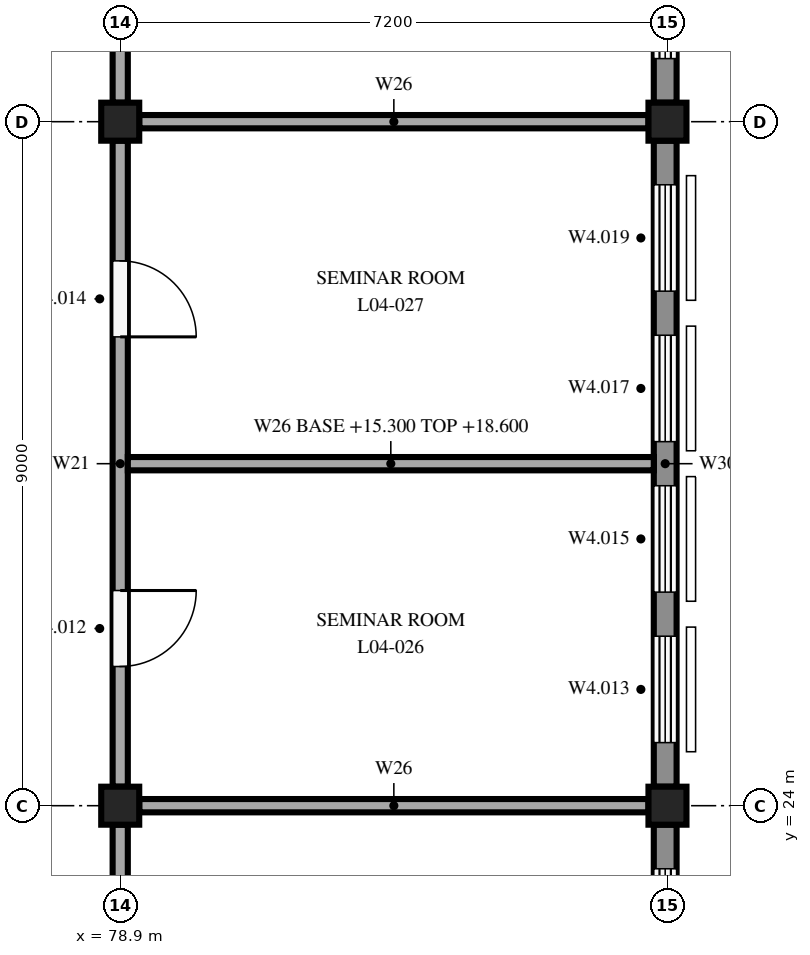
"""IFC4 building model, lengths in metres.
Left out: names, types, materials, properties, quantities, classifications, styles, units other than length and angle.
Written with IfcOpenShell. Run it as: python <this file> out.ifc"""

import sys

from ifc_helpers import new_model, si_unit, direction, frame, frame_2d, origin, origin_2d, place, context, subcontext, project, spatial, rectangle, extrude, element, fill, save


model = new_model("IFC4")
c1 = context("Model", 3, precision=1e-05, world=origin(), true_north=direction((0.0, 1.0)))
c2 = subcontext(c1, "Body", "Model", "MODEL_VIEW")
j1 = project(units=[si_unit("LENGTHUNIT", "METRE"), si_unit("PLANEANGLEUNIT", "RADIAN")], contexts=[c1])
p1 = place(None, origin())
s1 = spatial("IfcSite", under=j1, at=p1, CompositionType="ELEMENT")
p2 = place(p1, origin())
s2 = spatial("IfcBuilding", under=s1, at=p2, CompositionType="ELEMENT")
p3 = place(p2, frame((0.0, 0.0, 15.3)))
s3 = spatial("IfcBuildingStorey", under=s2, at=p3, CompositionType="ELEMENT", Elevation=15.3)
for number, where, z_axis, x_axis in (
    (1, (78.9, 24.0, 0.0), (0.0, 0.0, 1.0), (1.0, 0.0, 0.0)),
    (2, (78.9, 33.0, 0.0), (0.0, 0.0, 1.0), (1.0, 0.0, 0.0)),
    (3, (86.1, 24.0, 0.0), (0.0, 0.0, 1.0), (1.0, 0.0, 0.0)),
    (4, (86.1, 33.0, 0.0), (0.0, 0.0, 1.0), (1.0, 0.0, 0.0)),
):
    element("IfcColumn", number, at=place(p3, frame(where, z_axis=z_axis, x_axis=x_axis)), inside=s3, PredefinedType="COLUMN", context=c2, shape_type="SweptSolid", body=[
        extrude(rectangle(XDim=0.5, YDim=0.5, at=origin_2d()), origin(), (0.0, 0.0, 1.0), 3.3),
    ])
p4 = place(p3, frame((86.07, 23.75, 0.0), z_axis=(0.0, 0.0, 1.0), x_axis=(0.0, -1.0, 0.0)))
e5 = element("IfcWall", 5, at=p4, inside=s3, PredefinedType="STANDARD", context=c2, shape_type="SweptSolid", body=[
    extrude(rectangle(XDim=8.5, YDim=0.3, at=frame_2d((4.25, 0.0))), origin(), (0.0, 0.0, 1.0), 2.75),
])
p5 = place(p4, frame((6.52, 0.0, 0.6)))
e6 = element("IfcOpeningElement", 6, at=p5, cuts=e5, PredefinedType="OPENING", context=c2, shape_type="SweptSolid", body=[
    extrude(rectangle(XDim=1.4, YDim=2.1, at=frame_2d((0.7, 1.05))), frame((0.0, 0.16, 0.0), z_axis=(0.0, -1.0, 0.0), x_axis=(1.0, 0.0, 0.0)), (0.0, 0.0, 1.0), 0.32),
])
p6 = place(p4, frame((4.54, 0.0, 0.6)))
e7 = element("IfcOpeningElement", 7, at=p6, cuts=e5, PredefinedType="OPENING", context=c2, shape_type="SweptSolid", body=[
    extrude(rectangle(XDim=1.4, YDim=2.1, at=frame_2d((0.7, 1.05))), frame((0.0, 0.16, 0.0), z_axis=(0.0, -1.0, 0.0), x_axis=(1.0, 0.0, 0.0)), (0.0, 0.0, 1.0), 0.32),
])
p7 = place(p4, frame((2.56, 0.0, 0.6)))
e8 = element("IfcOpeningElement", 8, at=p7, cuts=e5, PredefinedType="OPENING", context=c2, shape_type="SweptSolid", body=[
    extrude(rectangle(XDim=1.4, YDim=2.1, at=frame_2d((0.7, 1.05))), frame((0.0, 0.16, 0.0), z_axis=(0.0, -1.0, 0.0), x_axis=(1.0, 0.0, 0.0)), (0.0, 0.0, 1.0), 0.32),
])
p8 = place(p4, frame((0.58, 0.0, 0.6)))
e9 = element("IfcOpeningElement", 9, at=p8, cuts=e5, PredefinedType="OPENING", context=c2, shape_type="SweptSolid", body=[
    extrude(rectangle(XDim=1.4, YDim=2.1, at=frame_2d((0.7, 1.05))), frame((0.0, 0.16, 0.0), z_axis=(0.0, -1.0, 0.0), x_axis=(1.0, 0.0, 0.0)), (0.0, 0.0, 1.0), 0.32),
])
p9 = place(p3, frame((86.07, 32.75, 0.0), z_axis=(0.0, 0.0, 1.0), x_axis=(0.0, -1.0, 0.0)))
e10 = element("IfcWall", 10, at=p9, inside=s3, PredefinedType="STANDARD", context=c2, shape_type="SweptSolid", body=[
    extrude(rectangle(XDim=8.5, YDim=0.3, at=frame_2d((4.25, 0.0))), origin(), (0.0, 0.0, 1.0), 2.75),
])
p10 = place(p9, frame((6.52, 0.0, 0.6)))
e11 = element("IfcOpeningElement", 11, at=p10, cuts=e10, PredefinedType="OPENING", context=c2, shape_type="SweptSolid", body=[
    extrude(rectangle(XDim=1.4, YDim=2.1, at=frame_2d((0.7, 1.05))), frame((0.0, 0.16, 0.0), z_axis=(0.0, -1.0, 0.0), x_axis=(1.0, 0.0, 0.0)), (0.0, 0.0, 1.0), 0.32),
])
p11 = place(p9, frame((4.54, 0.0, 0.6)))
e12 = element("IfcOpeningElement", 12, at=p11, cuts=e10, PredefinedType="OPENING", context=c2, shape_type="SweptSolid", body=[
    extrude(rectangle(XDim=1.4, YDim=2.1, at=frame_2d((0.7, 1.05))), frame((0.0, 0.16, 0.0), z_axis=(0.0, -1.0, 0.0), x_axis=(1.0, 0.0, 0.0)), (0.0, 0.0, 1.0), 0.32),
])
p12 = place(p9, frame((2.56, 0.0, 0.6)))
e13 = element("IfcOpeningElement", 13, at=p12, cuts=e10, PredefinedType="OPENING", context=c2, shape_type="SweptSolid", body=[
    extrude(rectangle(XDim=1.4, YDim=2.1, at=frame_2d((0.7, 1.05))), frame((0.0, 0.16, 0.0), z_axis=(0.0, -1.0, 0.0), x_axis=(1.0, 0.0, 0.0)), (0.0, 0.0, 1.0), 0.32),
])
p13 = place(p9, frame((0.58, 0.0, 0.6)))
e14 = element("IfcOpeningElement", 14, at=p13, cuts=e10, PredefinedType="OPENING", context=c2, shape_type="SweptSolid", body=[
    extrude(rectangle(XDim=1.4, YDim=2.1, at=frame_2d((0.7, 1.05))), frame((0.0, 0.16, 0.0), z_axis=(0.0, -1.0, 0.0), x_axis=(1.0, 0.0, 0.0)), (0.0, 0.0, 1.0), 0.32),
])
p14 = place(p3, frame((86.07, 41.75, 0.0), z_axis=(0.0, 0.0, 1.0), x_axis=(0.0, -1.0, 0.0)))
e15 = element("IfcWall", 15, at=p14, inside=s3, PredefinedType="STANDARD", context=c2, shape_type="SweptSolid", body=[
    extrude(rectangle(XDim=8.5, YDim=0.3, at=frame_2d((4.25, 0.0))), origin(), (0.0, 0.0, 1.0), 2.75),
])
p15 = place(p14, frame((6.52, 0.0, 0.6)))
e16 = element("IfcOpeningElement", 16, at=p15, cuts=e15, PredefinedType="OPENING", context=c2, shape_type="SweptSolid", body=[
    extrude(rectangle(XDim=1.4, YDim=2.1, at=frame_2d((0.7, 1.05))), frame((0.0, 0.16, 0.0), z_axis=(0.0, -1.0, 0.0), x_axis=(1.0, 0.0, 0.0)), (0.0, 0.0, 1.0), 0.32),
])
p16 = place(p14, frame((4.54, 0.0, 0.6)))
e17 = element("IfcOpeningElement", 17, at=p16, cuts=e15, PredefinedType="OPENING", context=c2, shape_type="SweptSolid", body=[
    extrude(rectangle(XDim=1.4, YDim=2.1, at=frame_2d((0.7, 1.05))), frame((0.0, 0.16, 0.0), z_axis=(0.0, -1.0, 0.0), x_axis=(1.0, 0.0, 0.0)), (0.0, 0.0, 1.0), 0.32),
])
p17 = place(p14, frame((2.56, 0.0, 0.6)))
e18 = element("IfcOpeningElement", 18, at=p17, cuts=e15, PredefinedType="OPENING", context=c2, shape_type="SweptSolid", body=[
    extrude(rectangle(XDim=1.4, YDim=2.1, at=frame_2d((0.7, 1.05))), frame((0.0, 0.16, 0.0), z_axis=(0.0, -1.0, 0.0), x_axis=(1.0, 0.0, 0.0)), (0.0, 0.0, 1.0), 0.32),
])
p18 = place(p14, frame((0.58, 0.0, 0.6)))
e19 = element("IfcOpeningElement", 19, at=p18, cuts=e15, PredefinedType="OPENING", context=c2, shape_type="SweptSolid", body=[
    extrude(rectangle(XDim=1.4, YDim=2.1, at=frame_2d((0.7, 1.05))), frame((0.0, 0.16, 0.0), z_axis=(0.0, -1.0, 0.0), x_axis=(1.0, 0.0, 0.0)), (0.0, 0.0, 1.0), 0.32),
])
p19 = place(p3, frame((78.9, 23.75, 0.0), z_axis=(0.0, 0.0, 1.0), x_axis=(0.0, -1.0, 0.0)))
e20 = element("IfcWall", 20, at=p19, inside=s3, PredefinedType="PARTITIONING", context=c2, shape_type="SweptSolid", body=[
    extrude(rectangle(XDim=8.5, YDim=0.2, at=frame_2d((4.25, 0.0))), origin(), (0.0, 0.0, 1.0), 2.8),
])
p20 = place(p19, frame((3.75, 0.0, 0.0)))
e21 = element("IfcOpeningElement", 21, at=p20, cuts=e20, PredefinedType="OPENING", context=c2, shape_type="SweptSolid", body=[
    extrude(rectangle(XDim=1.0, YDim=2.1, at=frame_2d((0.5, 1.05))), frame((0.0, 0.11, 0.0), z_axis=(0.0, -1.0, 0.0), x_axis=(1.0, 0.0, 0.0)), (0.0, 0.0, 1.0), 0.22),
])
p21 = place(p3, frame((78.9, 32.75, 0.0), z_axis=(0.0, 0.0, 1.0), x_axis=(0.0, -1.0, 0.0)))
e22 = element("IfcWall", 22, at=p21, inside=s3, PredefinedType="PARTITIONING", context=c2, shape_type="SweptSolid", body=[
    extrude(rectangle(XDim=8.5, YDim=0.2, at=frame_2d((4.25, 0.0))), origin(), (0.0, 0.0, 1.0), 2.8),
])
p22 = place(p21, frame((5.919, 0.0, 0.0)))
e23 = element("IfcOpeningElement", 23, at=p22, cuts=e22, PredefinedType="OPENING", context=c2, shape_type="SweptSolid", body=[
    extrude(rectangle(XDim=1.0, YDim=2.1, at=frame_2d((0.5, 1.05))), frame((0.0, 0.11, 0.0), z_axis=(0.0, -1.0, 0.0), x_axis=(1.0, 0.0, 0.0)), (0.0, 0.0, 1.0), 0.22),
])
p23 = place(p21, frame((1.581, 0.0, 0.0)))
e24 = element("IfcOpeningElement", 24, at=p23, cuts=e22, PredefinedType="OPENING", context=c2, shape_type="SweptSolid", body=[
    extrude(rectangle(XDim=1.0, YDim=2.1, at=frame_2d((0.5, 1.05))), frame((0.0, 0.11, 0.0), z_axis=(0.0, -1.0, 0.0), x_axis=(1.0, 0.0, 0.0)), (0.0, 0.0, 1.0), 0.22),
])
p24 = place(p3, frame((78.9, 41.75, 0.0), z_axis=(0.0, 0.0, 1.0), x_axis=(0.0, -1.0, 0.0)))
e25 = element("IfcWall", 25, at=p24, inside=s3, PredefinedType="PARTITIONING", context=c2, shape_type="SweptSolid", body=[
    extrude(rectangle(XDim=8.5, YDim=0.2, at=frame_2d((4.25, 0.0))), origin(), (0.0, 0.0, 1.0), 2.8),
])
p25 = place(p24, frame((3.75, 0.0, 0.0)))
e26 = element("IfcOpeningElement", 26, at=p25, cuts=e25, PredefinedType="OPENING", context=c2, shape_type="SweptSolid", body=[
    extrude(rectangle(XDim=1.0, YDim=2.1, at=frame_2d((0.5, 1.05))), frame((0.0, 0.11, 0.0), z_axis=(0.0, -1.0, 0.0), x_axis=(1.0, 0.0, 0.0)), (0.0, 0.0, 1.0), 0.22),
])
p26 = place(p3, frame((79.15, 24.0, 0.0), z_axis=(0.0, 0.0, 1.0), x_axis=(1.0, 0.0, 0.0)))
e27 = element("IfcWall", 27, at=p26, inside=s3, PredefinedType="PARTITIONING", context=c2, shape_type="SweptSolid", body=[
    extrude(rectangle(XDim=6.7, YDim=0.175, at=frame_2d((3.35, 0.0))), origin(), (0.0, 0.0, 1.0), 2.8),
])
p27 = place(p3, frame((79.0, 28.5, 0.0), z_axis=(0.0, 0.0, 1.0), x_axis=(1.0, 0.0, 0.0)))
e28 = element("IfcWall", 28, at=p27, inside=s3, PredefinedType="PARTITIONING", context=c2, shape_type="SweptSolid", body=[
    extrude(rectangle(XDim=6.92, YDim=0.175, at=frame_2d((3.46, 0.0))), origin(), (0.0, 0.0, 1.0), 3.3),
])
p28 = place(p3, frame((79.15, 33.0, 0.0), z_axis=(0.0, 0.0, 1.0), x_axis=(1.0, 0.0, 0.0)))
e29 = element("IfcWall", 29, at=p28, inside=s3, PredefinedType="PARTITIONING", context=c2, shape_type="SweptSolid", body=[
    extrude(rectangle(XDim=6.7, YDim=0.175, at=frame_2d((3.35, 0.0))), origin(), (0.0, 0.0, 1.0), 2.8),
])
p29 = place(p8, origin())
e30 = element("IfcWindow", 30, at=p29, inside=s3, PartitioningType="DOUBLE_PANEL_VERTICAL", PredefinedType="WINDOW", context=c2, shape_type="SweptSolid", body=[
    extrude(rectangle(XDim=1.4, YDim=2.1, at=frame_2d((0.7, 1.05))), frame((0.0, 0.03, 0.0), z_axis=(0.0, -1.0, 0.0), x_axis=(1.0, 0.0, 0.0)), (0.0, 0.0, 1.0), 0.06),
])
fill(e9, e30)
p30 = place(p10, origin())
e31 = element("IfcWindow", 31, at=p30, inside=s3, PartitioningType="DOUBLE_PANEL_VERTICAL", PredefinedType="WINDOW", context=c2, shape_type="SweptSolid", body=[
    extrude(rectangle(XDim=1.4, YDim=2.1, at=frame_2d((0.7, 1.05))), frame((0.0, 0.03, 0.0), z_axis=(0.0, -1.0, 0.0), x_axis=(1.0, 0.0, 0.0)), (0.0, 0.0, 1.0), 0.06),
])
fill(e11, e31)
p31 = place(p11, origin())
e32 = element("IfcWindow", 32, at=p31, inside=s3, PartitioningType="DOUBLE_PANEL_VERTICAL", PredefinedType="WINDOW", context=c2, shape_type="SweptSolid", body=[
    extrude(rectangle(XDim=1.4, YDim=2.1, at=frame_2d((0.7, 1.05))), frame((0.0, 0.03, 0.0), z_axis=(0.0, -1.0, 0.0), x_axis=(1.0, 0.0, 0.0)), (0.0, 0.0, 1.0), 0.06),
])
fill(e12, e32)
p32 = place(p12, origin())
e33 = element("IfcWindow", 33, at=p32, inside=s3, PartitioningType="DOUBLE_PANEL_VERTICAL", PredefinedType="WINDOW", context=c2, shape_type="SweptSolid", body=[
    extrude(rectangle(XDim=1.4, YDim=2.1, at=frame_2d((0.7, 1.05))), frame((0.0, 0.03, 0.0), z_axis=(0.0, -1.0, 0.0), x_axis=(1.0, 0.0, 0.0)), (0.0, 0.0, 1.0), 0.06),
])
fill(e13, e33)
p33 = place(p13, origin())
e34 = element("IfcWindow", 34, at=p33, inside=s3, PartitioningType="DOUBLE_PANEL_VERTICAL", PredefinedType="WINDOW", context=c2, shape_type="SweptSolid", body=[
    extrude(rectangle(XDim=1.4, YDim=2.1, at=frame_2d((0.7, 1.05))), frame((0.0, 0.03, 0.0), z_axis=(0.0, -1.0, 0.0), x_axis=(1.0, 0.0, 0.0)), (0.0, 0.0, 1.0), 0.06),
])
fill(e14, e34)
p34 = place(p15, origin())
e35 = element("IfcWindow", 35, at=p34, inside=s3, PartitioningType="DOUBLE_PANEL_VERTICAL", PredefinedType="WINDOW", context=c2, shape_type="SweptSolid", body=[
    extrude(rectangle(XDim=1.4, YDim=2.1, at=frame_2d((0.7, 1.05))), frame((0.0, 0.03, 0.0), z_axis=(0.0, -1.0, 0.0), x_axis=(1.0, 0.0, 0.0)), (0.0, 0.0, 1.0), 0.06),
])
fill(e16, e35)
p35 = place(p22, origin())
e36 = element("IfcDoor", 36, at=p35, inside=s3, OperationType="SINGLE_SWING_LEFT", PredefinedType="DOOR", context=c2, shape_type="SweptSolid", body=[
    extrude(rectangle(XDim=1.0, YDim=2.1, at=frame_2d((0.5, 1.05))), frame((0.0, 0.025, 0.0), z_axis=(0.0, -1.0, 0.0), x_axis=(1.0, 0.0, 0.0)), (0.0, 0.0, 1.0), 0.05),
])
fill(e23, e36)
p36 = place(p23, origin())
e37 = element("IfcDoor", 37, at=p36, inside=s3, OperationType="SINGLE_SWING_RIGHT", PredefinedType="DOOR", context=c2, shape_type="SweptSolid", body=[
    extrude(rectangle(XDim=1.0, YDim=2.1, at=frame_2d((0.5, 1.05))), frame((0.0, 0.025, 0.0), z_axis=(0.0, -1.0, 0.0), x_axis=(1.0, 0.0, 0.0)), (0.0, 0.0, 1.0), 0.05),
])
fill(e24, e37)
save(model, sys.argv[1])
